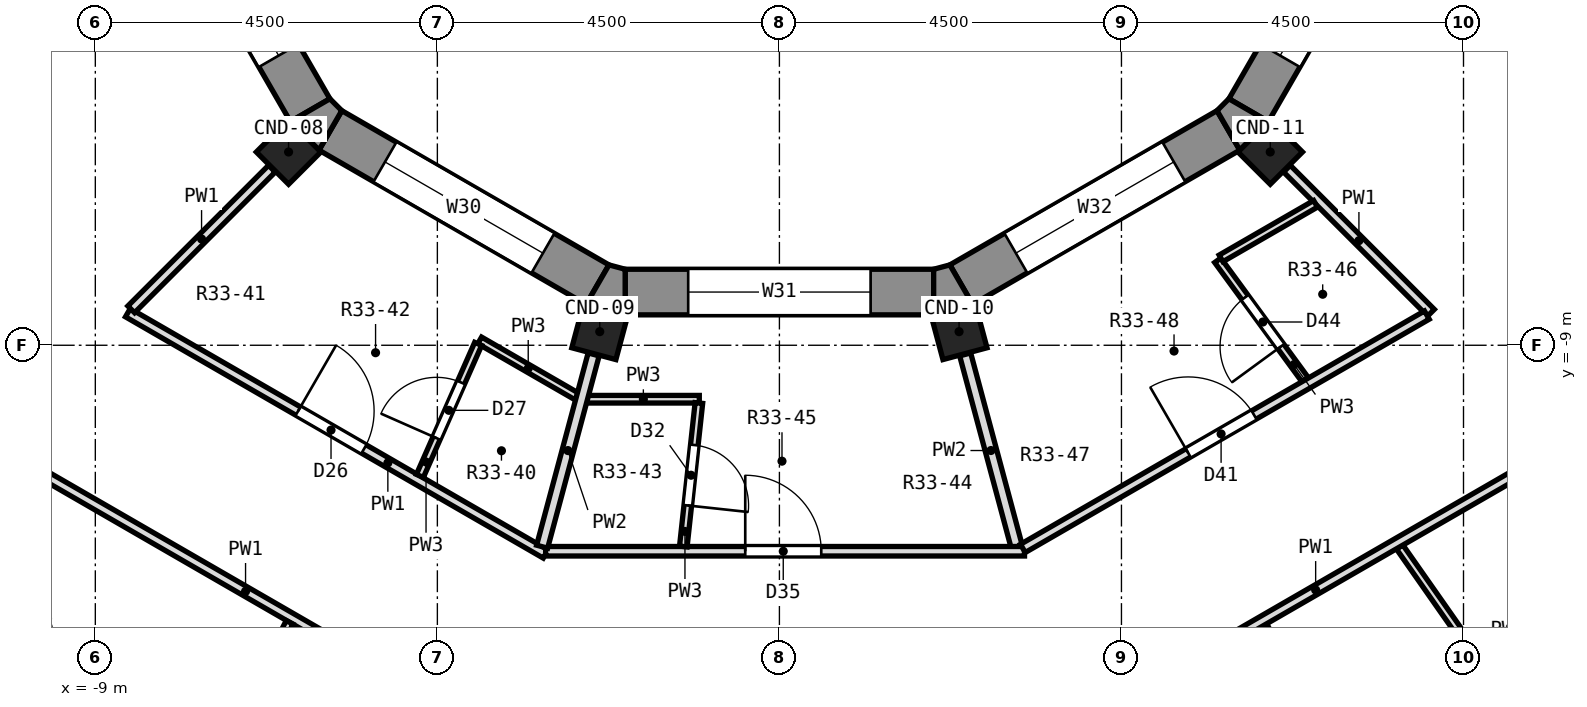
"""IFC4 building model, lengths in metres.
Left out: names, types, materials, properties, quantities, classifications, styles, units other than length and angle.
Written with IfcOpenShell. Run it as: python <this file> out.ifc"""

import sys

from ifc_helpers import new_model, si_unit, direction, frame, frame_2d, origin, origin_2d, place, context, subcontext, project, spatial, polyline, rectangle, outline, extrude, element, fill, save


model = new_model("IFC4")
c1 = context("Model", 3, precision=1e-05, world=origin(), true_north=direction((0.0, 1.0)))
c2 = subcontext(c1, "Body", "Model", "MODEL_VIEW")
j1 = project(units=[si_unit("LENGTHUNIT", "METRE"), si_unit("PLANEANGLEUNIT", "RADIAN")], contexts=[c1])
p1 = place(None, origin())
s1 = spatial("IfcSite", under=j1, at=p1, CompositionType="ELEMENT")
p2 = place(p1, origin())
s2 = spatial("IfcBuilding", under=s1, at=p2, CompositionType="ELEMENT")
p3 = place(p2, frame((0.0, 0.0, 229.7)))
s3 = spatial("IfcBuildingStorey", under=s2, at=p3, CompositionType="ELEMENT", Elevation=229.7)
for number, where, z_axis, x_axis in (
    (1, (-6.458, -6.458, 0.0), (0.0, 0.0, 1.0), (-0.707, -0.707, 0.0)),
    (2, (-2.364, -8.821, 0.0), (0.0, 0.0, 1.0), (-0.259, -0.966, 0.0)),
    (3, (2.364, -8.821, 0.0), (0.0, 0.0, 1.0), (0.259, -0.966, 0.0)),
    (4, (6.458, -6.458, 0.0), (0.0, 0.0, 1.0), (0.707, -0.707, 0.0)),
):
    element("IfcColumn", number, at=place(p3, frame(where, z_axis=z_axis, x_axis=x_axis)), inside=s3, PredefinedType="COLUMN", context=c2, shape_type="SweptSolid", body=[
        extrude(rectangle(XDim=0.6, YDim=0.6, at=origin_2d()), origin(), (0.0, 0.0, 1.0), 3.3),
    ])
p4 = place(p3, frame((-8.203, -2.393, 0.0), z_axis=(0.0, 0.0, 1.0), x_axis=(0.499994954979, -0.866028316509, 0.0)))
e5 = element("IfcWall", 5, at=p4, inside=s3, PredefinedType="SOLIDWALL", context=c2, shape_type="SweptSolid", body=[
    extrude(rectangle(XDim=4.059, YDim=0.6, at=frame_2d((2.029, 0.0))), origin(), (0.0, 0.0, 1.0), 2.9),
])
p5 = place(p4, frame((0.829, 0.0, 0.9)))
e6 = element("IfcOpeningElement", 6, at=p5, cuts=e5, PredefinedType="OPENING", context=c2, shape_type="SweptSolid", body=[
    extrude(rectangle(XDim=2.4, YDim=1.8, at=frame_2d((1.2, 0.9))), frame((0.0, 0.312, 0.0), z_axis=(0.0, -1.0, 0.0), x_axis=(1.0, 0.0, 0.0)), (0.0, 0.0, 1.0), 0.624),
])
p6 = place(p3, frame((-5.907, -6.173, 0.0), z_axis=(0.0, 0.0, 1.0), x_axis=(0.866028316509, -0.499994954979, 0.0)))
e7 = element("IfcWall", 7, at=p6, inside=s3, PredefinedType="SOLIDWALL", context=c2, shape_type="SweptSolid", body=[
    extrude(rectangle(XDim=4.059, YDim=0.6, at=frame_2d((2.029, 0.0))), origin(), (0.0, 0.0, 1.0), 2.9),
])
p7 = place(p6, frame((0.829, 0.0, 0.9)))
e8 = element("IfcOpeningElement", 8, at=p7, cuts=e7, PredefinedType="OPENING", context=c2, shape_type="SweptSolid", body=[
    extrude(rectangle(XDim=2.4, YDim=1.8, at=frame_2d((1.2, 0.9))), frame((0.0, 0.312, 0.0), z_axis=(0.0, -1.0, 0.0), x_axis=(1.0, 0.0, 0.0)), (0.0, 0.0, 1.0), 0.624),
])
p8 = place(p3, frame((-2.029, -8.3, 0.0), z_axis=(0.0, 0.0, 1.0), x_axis=(1.0, 0.0, 0.0)))
e9 = element("IfcWall", 9, at=p8, inside=s3, PredefinedType="SOLIDWALL", context=c2, shape_type="SweptSolid", body=[
    extrude(rectangle(XDim=4.059, YDim=0.6, at=frame_2d((2.029, 0.0))), origin(), (0.0, 0.0, 1.0), 2.9),
])
p9 = place(p8, frame((0.829, 0.0, 0.9)))
e10 = element("IfcOpeningElement", 10, at=p9, cuts=e9, PredefinedType="OPENING", context=c2, shape_type="SweptSolid", body=[
    extrude(rectangle(XDim=2.4, YDim=1.8, at=frame_2d((1.2, 0.9))), frame((0.0, 0.312, 0.0), z_axis=(0.0, -1.0, 0.0), x_axis=(1.0, 0.0, 0.0)), (0.0, 0.0, 1.0), 0.624),
])
p10 = place(p3, frame((2.393, -8.203, 0.0), z_axis=(0.0, 0.0, 1.0), x_axis=(0.866028316509, 0.499994954979, 0.0)))
e11 = element("IfcWall", 11, at=p10, inside=s3, PredefinedType="SOLIDWALL", context=c2, shape_type="SweptSolid", body=[
    extrude(rectangle(XDim=4.059, YDim=0.6, at=frame_2d((2.029, 0.0))), origin(), (0.0, 0.0, 1.0), 2.9),
])
p11 = place(p10, frame((0.829, 0.0, 0.9)))
e12 = element("IfcOpeningElement", 12, at=p11, cuts=e11, PredefinedType="OPENING", context=c2, shape_type="SweptSolid", body=[
    extrude(rectangle(XDim=2.4, YDim=1.8, at=frame_2d((1.2, 0.9))), frame((0.0, 0.312, 0.0), z_axis=(0.0, -1.0, 0.0), x_axis=(1.0, 0.0, 0.0)), (0.0, 0.0, 1.0), 0.624),
])
p12 = place(p3, frame((6.173, -5.907, 0.0), z_axis=(0.0, 0.0, 1.0), x_axis=(0.499994954979, 0.866028316509, 0.0)))
e13 = element("IfcWall", 13, at=p12, inside=s3, PredefinedType="SOLIDWALL", context=c2, shape_type="SweptSolid", body=[
    extrude(rectangle(XDim=4.059, YDim=0.6, at=frame_2d((2.029, 0.0))), origin(), (0.0, 0.0, 1.0), 2.9),
])
p13 = place(p12, frame((0.829, 0.0, 0.9)))
e14 = element("IfcOpeningElement", 14, at=p13, cuts=e13, PredefinedType="OPENING", context=c2, shape_type="SweptSolid", body=[
    extrude(rectangle(XDim=2.4, YDim=1.8, at=frame_2d((1.2, 0.9))), frame((0.0, 0.312, 0.0), z_axis=(0.0, -1.0, 0.0), x_axis=(1.0, 0.0, 0.0)), (0.0, 0.0, 1.0), 0.624),
])
p14 = place(p3, origin())
e15 = element("IfcWall", 15, at=p14, inside=s3, PredefinedType="SOLIDWALL", context=c2, shape_type="SweptSolid", body=[
    extrude(outline(polyline([(-6.058, -6.433), (-5.758, -5.914), (-5.914, -5.758), (-6.433, -6.058), (-6.058, -6.433)])), origin(), (0.0, 0.0, 1.0), 2.9),
])
p15 = place(p3, origin())
e16 = element("IfcWall", 16, at=p15, inside=s3, PredefinedType="SOLIDWALL", context=c2, shape_type="SweptSolid", body=[
    extrude(outline(polyline([(-2.029, -8.6), (-2.029, -8.0), (-2.242, -7.943), (-2.542, -8.462), (-2.029, -8.6)])), origin(), (0.0, 0.0, 1.0), 2.9),
])
p16 = place(p3, origin())
e17 = element("IfcWall", 17, at=p16, inside=s3, PredefinedType="SOLIDWALL", context=c2, shape_type="SweptSolid", body=[
    extrude(outline(polyline([(2.542, -8.462), (2.242, -7.943), (2.029, -8.0), (2.029, -8.6), (2.542, -8.462)])), origin(), (0.0, 0.0, 1.0), 2.9),
])
p17 = place(p3, origin())
e18 = element("IfcWall", 18, at=p17, inside=s3, PredefinedType="SOLIDWALL", context=c2, shape_type="SweptSolid", body=[
    extrude(outline(polyline([(6.433, -6.058), (5.914, -5.758), (5.758, -5.914), (6.058, -6.433), (6.433, -6.058)])), origin(), (0.0, 0.0, 1.0), 2.9),
])
p18 = place(p3, frame((2.444, -9.12, 0.0), z_axis=(0.0, 0.0, 1.0), x_axis=(0.258823078531, -0.965924745526, 0.0)))
e19 = element("IfcWall", 19, at=p18, inside=s3, PredefinedType="PARTITIONING", context=c2, shape_type="SweptSolid", body=[
    extrude(rectangle(XDim=2.618, YDim=0.15, at=frame_2d((1.309, 0.0))), origin(), (0.0, 0.0, 1.0), 2.9),
])
p19 = place(p3, frame((6.369, -12.688, 0.0), z_axis=(0.0, 0.0, 1.0), x_axis=(0.448648311547, -0.893708393463, 0.0)))
e20 = element("IfcWall", 20, at=p19, inside=s3, PredefinedType="PARTITIONING", context=c2, shape_type="SweptSolid", body=[
    extrude(rectangle(XDim=2.041, YDim=0.1, at=frame_2d((1.021, 0.0))), origin(), (0.0, 0.0, 1.0), 2.9),
])
p20 = place(p3, frame((8.16, -11.654, 0.0), z_axis=(0.0, 0.0, 1.0), x_axis=(0.573580547772, -0.819149165426, 0.0)))
e21 = element("IfcWall", 21, at=p20, inside=s3, PredefinedType="PARTITIONING", context=c2, shape_type="SweptSolid", body=[
    extrude(rectangle(XDim=3.604, YDim=0.1, at=frame_2d((1.802, 0.0))), origin(), (0.0, 0.0, 1.0), 2.9),
])
p21 = place(p20, frame((2.405, 0.0, 0.0)))
e22 = element("IfcOpeningElement", 22, at=p21, cuts=e21, PredefinedType="OPENING", context=c2, shape_type="SweptSolid", body=[
    extrude(rectangle(XDim=0.9, YDim=2.1, at=frame_2d((0.45, 1.05))), frame((0.0, 0.062, 0.0), z_axis=(0.0, -1.0, 0.0), x_axis=(1.0, 0.0, 0.0)), (0.0, 0.0, 1.0), 0.124),
])
p22 = place(p3, frame((5.767, -7.882, 0.0), z_axis=(0.0, 0.0, 1.0), x_axis=(0.590418468895, -0.807097287561, 0.0)))
e23 = element("IfcWall", 23, at=p22, inside=s3, PredefinedType="PARTITIONING", context=c2, shape_type="SweptSolid", body=[
    extrude(rectangle(XDim=1.949, YDim=0.1, at=frame_2d((0.975, 0.0))), origin(), (0.0, 0.0, 1.0), 2.9),
])
p23 = place(p22, frame((0.606, 0.0, 0.0)))
e24 = element("IfcOpeningElement", 24, at=p23, cuts=e23, PredefinedType="OPENING", context=c2, shape_type="SweptSolid", body=[
    extrude(rectangle(XDim=0.8, YDim=2.1, at=frame_2d((0.4, 1.05))), frame((0.0, 0.062, 0.0), z_axis=(0.0, -1.0, 0.0), x_axis=(1.0, 0.0, 0.0)), (0.0, 0.0, 1.0), 0.124),
])
p24 = place(p3, frame((6.677, -6.677, 0.0), z_axis=(0.0, 0.0, 1.0), x_axis=(0.707106781187, -0.707106781187, 0.0)))
e25 = element("IfcWall", 25, at=p24, inside=s3, PredefinedType="PARTITIONING", context=c2, shape_type="SweptSolid", body=[
    extrude(rectangle(XDim=2.68, YDim=0.125, at=frame_2d((1.34, 0.0))), origin(), (0.0, 0.0, 1.0), 2.9),
])
p25 = place(p3, frame((-10.329, -10.329, 0.0), z_axis=(0.0, 0.0, 1.0), x_axis=(0.866010352672, -0.500026068385, 0.0)))
e26 = element("IfcWall", 26, at=p25, inside=s3, PredefinedType="PARTITIONING", context=c2, shape_type="SweptSolid", body=[
    extrude(rectangle(XDim=7.633, YDim=0.125, at=frame_2d((3.817, 0.0))), origin(), (0.0, 0.0, 1.0), 2.9),
])
p26 = place(p3, frame((-8.572, -8.572, 0.0), z_axis=(0.0, 0.0, 1.0), x_axis=(0.865983161714, -0.500073158277, 0.0)))
e27 = element("IfcWall", 27, at=p26, inside=s3, PredefinedType="PARTITIONING", context=c2, shape_type="SweptSolid", body=[
    extrude(rectangle(XDim=6.347, YDim=0.125, at=frame_2d((3.174, 0.0))), origin(), (0.0, 0.0, 1.0), 2.9),
])
p27 = place(p26, frame((2.587, 0.0, 0.0)))
e28 = element("IfcOpeningElement", 28, at=p27, cuts=e27, PredefinedType="OPENING", context=c2, shape_type="SweptSolid", body=[
    extrude(rectangle(XDim=1.0, YDim=2.1, at=frame_2d((0.5, 1.05))), frame((0.0, 0.074, 0.0), z_axis=(0.0, -1.0, 0.0), x_axis=(1.0, 0.0, 0.0)), (0.0, 0.0, 1.0), 0.149),
])
p28 = place(p3, frame((-3.943, -8.936, 0.0), z_axis=(0.0, 0.0, 1.0), x_axis=(0.866083503307, -0.499899355171, 0.0)))
e29 = element("IfcWall", 29, at=p28, inside=s3, PredefinedType="PARTITIONING", context=c2, shape_type="SweptSolid", body=[
    extrude(rectangle(XDim=1.473, YDim=0.1, at=frame_2d((0.737, 0.0))), origin(), (0.0, 0.0, 1.0), 2.9),
])
p29 = place(p3, frame((-3.075, -11.71, 0.0), z_axis=(0.0, 0.0, 1.0), x_axis=(1.0, 0.0, 0.0)))
e30 = element("IfcWall", 30, at=p29, inside=s3, PredefinedType="PARTITIONING", context=c2, shape_type="SweptSolid", body=[
    extrude(rectangle(XDim=6.3, YDim=0.125, at=frame_2d((3.15, 0.0))), origin(), (0.0, 0.0, 1.0), 2.9),
])
p30 = place(p29, frame((2.626, 0.0, 0.0)))
e31 = element("IfcOpeningElement", 31, at=p30, cuts=e30, PredefinedType="OPENING", context=c2, shape_type="SweptSolid", body=[
    extrude(rectangle(XDim=1.0, YDim=2.1, at=frame_2d((0.5, 1.05))), frame((0.0, 0.074, 0.0), z_axis=(0.0, -1.0, 0.0), x_axis=(1.0, 0.0, 0.0)), (0.0, 0.0, 1.0), 0.149),
])
p31 = place(p3, frame((-2.527, -9.71, 0.0), z_axis=(0.0, 0.0, 1.0), x_axis=(1.0, 0.0, 0.0)))
e32 = element("IfcWall", 32, at=p31, inside=s3, PredefinedType="PARTITIONING", context=c2, shape_type="SweptSolid", body=[
    extrude(rectangle(XDim=1.473, YDim=0.1, at=frame_2d((0.737, 0.0))), origin(), (0.0, 0.0, 1.0), 2.9),
])
p32 = place(p3, frame((3.835, -14.079, 0.0), z_axis=(0.0, 0.0, 1.0), x_axis=(0.865993671729, 0.500054957505, 0.0)))
e33 = element("IfcWall", 33, at=p32, inside=s3, PredefinedType="PARTITIONING", context=c2, shape_type="SweptSolid", body=[
    extrude(rectangle(XDim=7.436, YDim=0.125, at=frame_2d((3.718, 0.0))), origin(), (0.0, 0.0, 1.0), 2.9),
])
p33 = place(p3, frame((3.203, -11.673, 0.0), z_axis=(0.0, 0.0, 1.0), x_axis=(0.865972267571, 0.50009202333, 0.0)))
e34 = element("IfcWall", 34, at=p33, inside=s3, PredefinedType="PARTITIONING", context=c2, shape_type="SweptSolid", body=[
    extrude(rectangle(XDim=6.137, YDim=0.125, at=frame_2d((3.069, 0.0))), origin(), (0.0, 0.0, 1.0), 2.9),
])
p34 = place(p33, frame((2.512, 0.0, 0.0)))
e35 = element("IfcOpeningElement", 35, at=p34, cuts=e34, PredefinedType="OPENING", context=c2, shape_type="SweptSolid", body=[
    extrude(rectangle(XDim=1.0, YDim=2.1, at=frame_2d((0.5, 1.05))), frame((0.0, 0.074, 0.0), z_axis=(0.0, -1.0, 0.0), x_axis=(1.0, 0.0, 0.0)), (0.0, 0.0, 1.0), 0.149),
])
p35 = place(p3, frame((5.81, -7.857, 0.0), z_axis=(0.0, 0.0, 1.0), x_axis=(0.866100656052, 0.499869636591, 0.0)))
e36 = element("IfcWall", 36, at=p35, inside=s3, PredefinedType="PARTITIONING", context=c2, shape_type="SweptSolid", body=[
    extrude(rectangle(XDim=1.436, YDim=0.1, at=frame_2d((0.718, 0.0))), origin(), (0.0, 0.0, 1.0), 2.9),
])
p36 = place(p3, frame((-8.528, -8.528, 0.0), z_axis=(0.0, 0.0, 1.0), x_axis=(0.707106781187, 0.707106781187, 0.0)))
e37 = element("IfcWall", 37, at=p36, inside=s3, PredefinedType="PARTITIONING", context=c2, shape_type="SweptSolid", body=[
    extrude(rectangle(XDim=2.618, YDim=0.125, at=frame_2d((1.309, 0.0))), origin(), (0.0, 0.0, 1.0), 2.9),
])
p37 = place(p3, frame((-8.024, -15.747, 0.0), z_axis=(0.0, 0.0, 1.0), x_axis=(0.453766079843, 0.891120836242, 0.0)))
e38 = element("IfcWall", 38, at=p37, inside=s3, PredefinedType="PARTITIONING", context=c2, shape_type="SweptSolid", body=[
    extrude(rectangle(XDim=3.481, YDim=0.1, at=frame_2d((1.74, 0.0))), origin(), (0.0, 0.0, 1.0), 2.9),
])
p38 = place(p3, frame((-4.73, -10.719, 0.0), z_axis=(0.0, 0.0, 1.0), x_axis=(0.403751002976, 0.914868912794, 0.0)))
e39 = element("IfcWall", 39, at=p38, inside=s3, PredefinedType="PARTITIONING", context=c2, shape_type="SweptSolid", body=[
    extrude(rectangle(XDim=1.899, YDim=0.1, at=frame_2d((0.949, 0.0))), origin(), (0.0, 0.0, 1.0), 2.9),
])
p39 = place(p38, frame((0.543, 0.0, 0.0)))
e40 = element("IfcOpeningElement", 40, at=p39, cuts=e39, PredefinedType="OPENING", context=c2, shape_type="SweptSolid", body=[
    extrude(rectangle(XDim=0.8, YDim=2.1, at=frame_2d((0.4, 1.05))), frame((0.0, 0.062, 0.0), z_axis=(0.0, -1.0, 0.0), x_axis=(1.0, 0.0, 0.0)), (0.0, 0.0, 1.0), 0.124),
])
p40 = place(p3, frame((-3.122, -11.65, 0.0), z_axis=(0.0, 0.0, 1.0), x_axis=(0.258736085224, 0.965948051503, 0.0)))
e41 = element("IfcWall", 41, at=p40, inside=s3, PredefinedType="PARTITIONING", context=c2, shape_type="SweptSolid", body=[
    extrude(rectangle(XDim=2.618, YDim=0.15, at=frame_2d((1.309, 0.0))), origin(), (0.0, 0.0, 1.0), 2.9),
])
p41 = place(p3, frame((-1.264, -11.648, 0.0), z_axis=(0.0, 0.0, 1.0), x_axis=(0.107849279517, 0.994167256003, 0.0)))
e42 = element("IfcWall", 42, at=p41, inside=s3, PredefinedType="PARTITIONING", context=c2, shape_type="SweptSolid", body=[
    extrude(rectangle(XDim=1.899, YDim=0.1, at=frame_2d((0.95, 0.0))), origin(), (0.0, 0.0, 1.0), 2.9),
])
p42 = place(p41, frame((0.543, 0.0, 0.0)))
e43 = element("IfcOpeningElement", 43, at=p42, cuts=e42, PredefinedType="OPENING", context=c2, shape_type="SweptSolid", body=[
    extrude(rectangle(XDim=0.8, YDim=2.1, at=frame_2d((0.4, 1.05))), frame((0.0, 0.062, 0.0), z_axis=(0.0, -1.0, 0.0), x_axis=(1.0, 0.0, 0.0)), (0.0, 0.0, 1.0), 0.124),
])
p43 = place(p5, origin())
e44 = element("IfcWindow", 44, at=p43, inside=s3, PartitioningType="SINGLE_PANEL", PredefinedType="WINDOW", context=c2, shape_type="SweptSolid", body=[
    extrude(rectangle(XDim=2.4, YDim=1.8, at=frame_2d((1.2, 0.9))), frame((0.0, -0.12, 0.0), z_axis=(0.0, -1.0, 0.0), x_axis=(1.0, 0.0, 0.0)), (0.0, 0.0, 1.0), 0.06),
])
fill(e6, e44)
p44 = place(p7, origin())
e45 = element("IfcWindow", 45, at=p44, inside=s3, PartitioningType="SINGLE_PANEL", PredefinedType="WINDOW", context=c2, shape_type="SweptSolid", body=[
    extrude(rectangle(XDim=2.4, YDim=1.8, at=frame_2d((1.2, 0.9))), frame((0.0, -0.12, 0.0), z_axis=(0.0, -1.0, 0.0), x_axis=(1.0, 0.0, 0.0)), (0.0, 0.0, 1.0), 0.06),
])
fill(e8, e45)
p45 = place(p9, origin())
e46 = element("IfcWindow", 46, at=p45, inside=s3, PartitioningType="SINGLE_PANEL", PredefinedType="WINDOW", context=c2, shape_type="SweptSolid", body=[
    extrude(rectangle(XDim=2.4, YDim=1.8, at=frame_2d((1.2, 0.9))), frame((0.0, -0.12, 0.0), z_axis=(0.0, -1.0, 0.0), x_axis=(1.0, 0.0, 0.0)), (0.0, 0.0, 1.0), 0.06),
])
fill(e10, e46)
p46 = place(p11, origin())
e47 = element("IfcWindow", 47, at=p46, inside=s3, PartitioningType="SINGLE_PANEL", PredefinedType="WINDOW", context=c2, shape_type="SweptSolid", body=[
    extrude(rectangle(XDim=2.4, YDim=1.8, at=frame_2d((1.2, 0.9))), frame((0.0, -0.12, 0.0), z_axis=(0.0, -1.0, 0.0), x_axis=(1.0, 0.0, 0.0)), (0.0, 0.0, 1.0), 0.06),
])
fill(e12, e47)
p47 = place(p13, origin())
e48 = element("IfcWindow", 48, at=p47, inside=s3, PartitioningType="SINGLE_PANEL", PredefinedType="WINDOW", context=c2, shape_type="SweptSolid", body=[
    extrude(rectangle(XDim=2.4, YDim=1.8, at=frame_2d((1.2, 0.9))), frame((0.0, -0.12, 0.0), z_axis=(0.0, -1.0, 0.0), x_axis=(1.0, 0.0, 0.0)), (0.0, 0.0, 1.0), 0.06),
])
fill(e14, e48)
p48 = place(p27, origin())
e49 = element("IfcDoor", 49, at=p48, inside=s3, OperationType="SINGLE_SWING_LEFT", PredefinedType="DOOR", context=c2, shape_type="SweptSolid", body=[
    extrude(rectangle(XDim=1.0, YDim=2.1, at=frame_2d((0.5, 1.05))), frame((0.0, 0.025, 0.0), z_axis=(0.0, -1.0, 0.0), x_axis=(1.0, 0.0, 0.0)), (0.0, 0.0, 1.0), 0.05),
])
fill(e28, e49)
p49 = place(p39, origin())
e50 = element("IfcDoor", 50, at=p49, inside=s3, OperationType="SINGLE_SWING_LEFT", PredefinedType="DOOR", context=c2, shape_type="SweptSolid", body=[
    extrude(rectangle(XDim=0.8, YDim=2.1, at=frame_2d((0.4, 1.05))), frame((0.0, 0.025, 0.0), z_axis=(0.0, -1.0, 0.0), x_axis=(1.0, 0.0, 0.0)), (0.0, 0.0, 1.0), 0.05),
])
fill(e40, e50)
p50 = place(p42, frame((0.8, 0.0, 0.0), z_axis=(0.0, 0.0, 1.0), x_axis=(-1.0, 0.0, 0.0)))
e51 = element("IfcDoor", 51, at=p50, inside=s3, OperationType="SINGLE_SWING_RIGHT", PredefinedType="DOOR", context=c2, shape_type="SweptSolid", body=[
    extrude(rectangle(XDim=0.8, YDim=2.1, at=frame_2d((0.4, 1.05))), frame((0.0, 0.025, 0.0), z_axis=(0.0, -1.0, 0.0), x_axis=(1.0, 0.0, 0.0)), (0.0, 0.0, 1.0), 0.05),
])
fill(e43, e51)
p51 = place(p30, origin())
e52 = element("IfcDoor", 52, at=p51, inside=s3, OperationType="SINGLE_SWING_LEFT", PredefinedType="DOOR", context=c2, shape_type="SweptSolid", body=[
    extrude(rectangle(XDim=1.0, YDim=2.1, at=frame_2d((0.5, 1.05))), frame((0.0, 0.025, 0.0), z_axis=(0.0, -1.0, 0.0), x_axis=(1.0, 0.0, 0.0)), (0.0, 0.0, 1.0), 0.05),
])
fill(e31, e52)
p52 = place(p34, origin())
e53 = element("IfcDoor", 53, at=p52, inside=s3, OperationType="SINGLE_SWING_LEFT", PredefinedType="DOOR", context=c2, shape_type="SweptSolid", body=[
    extrude(rectangle(XDim=1.0, YDim=2.1, at=frame_2d((0.5, 1.05))), frame((0.0, 0.025, 0.0), z_axis=(0.0, -1.0, 0.0), x_axis=(1.0, 0.0, 0.0)), (0.0, 0.0, 1.0), 0.05),
])
fill(e35, e53)
p53 = place(p23, frame((0.8, 0.0, 0.0), z_axis=(0.0, 0.0, 1.0), x_axis=(-1.0, 0.0, 0.0)))
e54 = element("IfcDoor", 54, at=p53, inside=s3, OperationType="SINGLE_SWING_LEFT", PredefinedType="DOOR", context=c2, shape_type="SweptSolid", body=[
    extrude(rectangle(XDim=0.8, YDim=2.1, at=frame_2d((0.4, 1.05))), frame((0.0, 0.025, 0.0), z_axis=(0.0, -1.0, 0.0), x_axis=(1.0, 0.0, 0.0)), (0.0, 0.0, 1.0), 0.05),
])
fill(e24, e54)
save(model, sys.argv[1])
